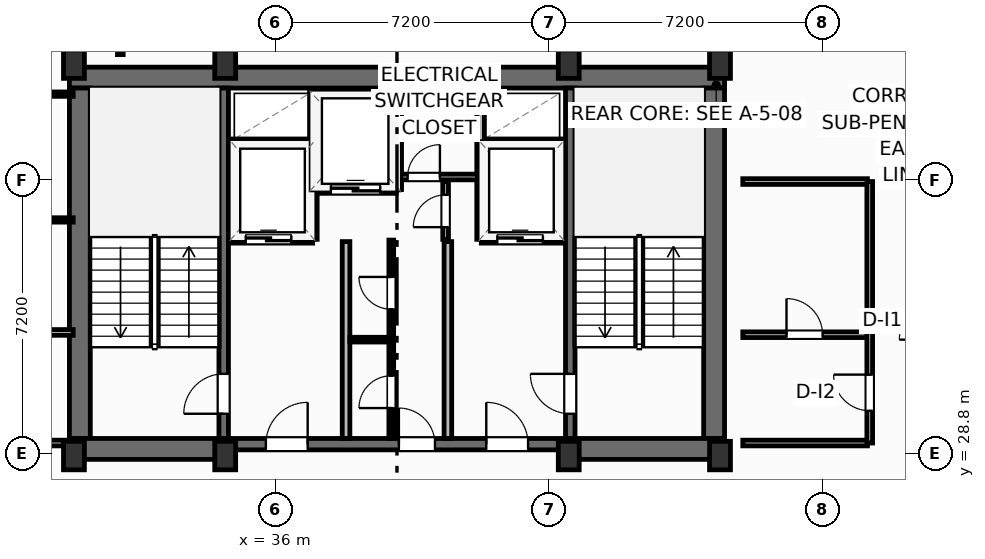
"""IFC4 building model, lengths in metres.
Left out: names, types, materials, properties, quantities, classifications, styles, units other than length and angle.
Written with IfcOpenShell. Run it as: python <this file> out.ifc"""

import sys

from ifc_helpers import new_model, si_unit, direction, frame, frame_2d, origin, origin_2d, place, context, subcontext, project, spatial, rectangle, extrude, element, fill, save


model = new_model("IFC4")
c1 = context("Model", 3, precision=1e-05, world=origin(), true_north=direction((0.0, 1.0)))
c2 = subcontext(c1, "Body", "Model", "MODEL_VIEW")
j1 = project(units=[si_unit("LENGTHUNIT", "METRE"), si_unit("PLANEANGLEUNIT", "RADIAN")], contexts=[c1])
p1 = place(None, origin())
s1 = spatial("IfcSite", under=j1, at=p1, CompositionType="ELEMENT")
p2 = place(p1, origin())
s2 = spatial("IfcBuilding", under=s1, at=p2, CompositionType="ELEMENT")
p3 = place(p2, frame((0.0, 0.0, 284.1)))
s3 = spatial("IfcBuildingStorey", under=s2, at=p3, CompositionType="ELEMENT", Elevation=284.1)
for number, where, z_axis, x_axis in (
    (1, (30.7, 28.75, 0.0), (0.0, 0.0, 1.0), (1.0, 0.0, 0.0)),
    (2, (34.68, 28.75, 0.0), (0.0, 0.0, 1.0), (1.0, 0.0, 0.0)),
    (3, (43.72, 28.75, 0.0), (0.0, 0.0, 1.0), (1.0, 0.0, 0.0)),
    (4, (47.7, 28.75, 0.0), (0.0, 0.0, 1.0), (1.0, 0.0, 0.0)),
    (5, (30.7, 39.05, 0.0), (0.0, 0.0, 1.0), (1.0, 0.0, 0.0)),
    (6, (34.68, 39.05, 0.0), (0.0, 0.0, 1.0), (1.0, 0.0, 0.0)),
    (7, (43.72, 39.05, 0.0), (0.0, 0.0, 1.0), (1.0, 0.0, 0.0)),
    (8, (47.7, 39.05, 0.0), (0.0, 0.0, 1.0), (1.0, 0.0, 0.0)),
):
    element("IfcColumn", number, at=place(p3, frame(where, z_axis=z_axis, x_axis=x_axis)), inside=s3, PredefinedType="COLUMN", context=c2, shape_type="SweptSolid", body=[
        extrude(rectangle(XDim=0.55, YDim=0.75, at=origin_2d()), origin(), (0.0, 0.0, 1.0), 3.7),
    ])
p4 = place(p3, frame((30.58, 38.695, 0.0), z_axis=(0.0, 0.0, 1.0), x_axis=(1.0, 0.0, 0.0)))
e9 = element("IfcWall", 9, at=p4, inside=s3, PredefinedType="SHEAR", context=c2, shape_type="SweptSolid", body=[
    extrude(rectangle(XDim=17.24, YDim=0.55, at=frame_2d((8.62, 0.0))), origin(), (0.0, 0.0, 1.0), 3.45),
])
for number, where, z_axis, x_axis in (
    (10, (30.855, 29.2, 0.0), (0.0, 0.0, 1.0), (0.0, 1.0, 0.0)),
    (11, (47.545, 29.2, 0.0), (0.0, 0.0, 1.0), (0.0, 1.0, 0.0)),
):
    element("IfcWall", number, at=place(p3, frame(where, z_axis=z_axis, x_axis=x_axis)), inside=s3, PredefinedType="SHEAR", context=c2, shape_type="SweptSolid", body=[
        extrude(rectangle(XDim=9.22, YDim=0.55, at=frame_2d((4.61, 0.0))), origin(), (0.0, 0.0, 1.0), 3.45),
    ])
for number, where, z_axis, x_axis in (
    (12, (30.58, 28.925, 0.0), (0.0, 0.0, 1.0), (1.0, 0.0, 0.0)),
    (13, (43.6, 28.925, 0.0), (0.0, 0.0, 1.0), (1.0, 0.0, 0.0)),
):
    element("IfcWall", number, at=place(p3, frame(where, z_axis=z_axis, x_axis=x_axis)), inside=s3, PredefinedType="SHEAR", context=c2, shape_type="SweptSolid", body=[
        extrude(rectangle(XDim=4.22, YDim=0.55, at=frame_2d((2.11, 0.0))), origin(), (0.0, 0.0, 1.0), 3.45),
    ])
p5 = place(p3, frame((34.8, 29.05, 0.0), z_axis=(0.0, 0.0, 1.0), x_axis=(1.0, 0.0, 0.0)))
e14 = element("IfcWall", 14, at=p5, inside=s3, PredefinedType="SHEAR", context=c2, shape_type="SweptSolid", body=[
    extrude(rectangle(XDim=8.8, YDim=0.3, at=frame_2d((4.4, 0.0))), origin(), (0.0, 0.0, 1.0), 3.45),
])
p6 = place(p5, frame((0.95, 0.0, 0.0)))
e15 = element("IfcOpeningElement", 15, at=p6, cuts=e14, PredefinedType="OPENING", context=c2, shape_type="SweptSolid", body=[
    extrude(rectangle(XDim=1.1, YDim=2.15, at=frame_2d((0.55, 1.075))), frame((0.0, 0.16, 0.0), z_axis=(0.0, -1.0, 0.0), x_axis=(1.0, 0.0, 0.0)), (0.0, 0.0, 1.0), 0.32),
])
p7 = place(p5, frame((6.75, 0.0, 0.0)))
e16 = element("IfcOpeningElement", 16, at=p7, cuts=e14, PredefinedType="OPENING", context=c2, shape_type="SweptSolid", body=[
    extrude(rectangle(XDim=1.1, YDim=2.15, at=frame_2d((0.55, 1.075))), frame((0.0, 0.16, 0.0), z_axis=(0.0, -1.0, 0.0), x_axis=(1.0, 0.0, 0.0)), (0.0, 0.0, 1.0), 0.32),
])
p8 = place(p5, frame((4.45, 0.0, 0.0)))
e17 = element("IfcOpeningElement", 17, at=p8, cuts=e14, PredefinedType="OPENING", context=c2, shape_type="SweptSolid", body=[
    extrude(rectangle(XDim=0.95, YDim=2.15, at=frame_2d((0.475, 1.075))), frame((0.0, 0.16, 0.0), z_axis=(0.0, -1.0, 0.0), x_axis=(1.0, 0.0, 0.0)), (0.0, 0.0, 1.0), 0.32),
])
p9 = place(p3, frame((34.64, 29.2, 0.0), z_axis=(0.0, 0.0, 1.0), x_axis=(0.0, 1.0, 0.0)))
e18 = element("IfcWall", 18, at=p9, inside=s3, PredefinedType="SHEAR", context=c2, shape_type="SweptSolid", body=[
    extrude(rectangle(XDim=9.22, YDim=0.25, at=frame_2d((4.61, 0.0))), origin(), (0.0, 0.0, 1.0), 3.45),
])
p10 = place(p9, frame((0.65, 0.0, 0.0)))
e19 = element("IfcOpeningElement", 19, at=p10, cuts=e18, PredefinedType="OPENING", context=c2, shape_type="SweptSolid", body=[
    extrude(rectangle(XDim=1.05, YDim=2.15, at=frame_2d((0.525, 1.075))), frame((0.0, 0.135, 0.0), z_axis=(0.0, -1.0, 0.0), x_axis=(1.0, 0.0, 0.0)), (0.0, 0.0, 1.0), 0.27),
])
p11 = place(p3, frame((43.76, 29.2, 0.0), z_axis=(0.0, 0.0, 1.0), x_axis=(0.0, 1.0, 0.0)))
e20 = element("IfcWall", 20, at=p11, inside=s3, PredefinedType="SHEAR", context=c2, shape_type="SweptSolid", body=[
    extrude(rectangle(XDim=9.22, YDim=0.25, at=frame_2d((4.61, 0.0))), origin(), (0.0, 0.0, 1.0), 3.45),
])
p12 = place(p11, frame((0.65, 0.0, 0.0)))
e21 = element("IfcOpeningElement", 21, at=p12, cuts=e20, PredefinedType="OPENING", context=c2, shape_type="SweptSolid", body=[
    extrude(rectangle(XDim=1.05, YDim=2.15, at=frame_2d((0.525, 1.075))), frame((0.0, 0.135, 0.0), z_axis=(0.0, -1.0, 0.0), x_axis=(1.0, 0.0, 0.0)), (0.0, 0.0, 1.0), 0.27),
])
p13 = place(p3, frame((26.297, 38.743, 0.0), z_axis=(0.0, 0.0, 1.0), x_axis=(0.823534636215, 0.567265989598, 0.0)))
e22 = element("IfcWall", 22, at=p13, inside=s3, PredefinedType="SOLIDWALL", context=c2, shape_type="SweptSolid", body=[
    extrude(rectangle(XDim=6.0, YDim=0.22, at=frame_2d((3.0, 0.0))), origin(), (0.0, 0.0, 1.0), 2.73),
])
p14 = place(p13, frame((3.5, 0.0, 0.0)))
e23 = element("IfcOpeningElement", 23, at=p14, cuts=e22, PredefinedType="OPENING", context=c2, shape_type="SweptSolid", body=[
    extrude(rectangle(XDim=2.1, YDim=2.3, at=frame_2d((1.05, 1.15))), frame((0.0, 0.12, 0.0), z_axis=(0.0, -1.0, 0.0), x_axis=(1.0, 0.0, 0.0)), (0.0, 0.0, 1.0), 0.24),
])
p15 = place(p13, frame((0.55, 0.0, 0.75)))
e24 = element("IfcOpeningElement", 24, at=p15, cuts=e22, PredefinedType="OPENING", context=c2, shape_type="SweptSolid", body=[
    extrude(rectangle(XDim=2.4, YDim=1.85, at=frame_2d((1.2, 0.925))), frame((0.0, 0.12, 0.0), z_axis=(0.0, -1.0, 0.0), x_axis=(1.0, 0.0, 0.0)), (0.0, 0.0, 1.0), 0.24),
])
p16 = place(p3, frame((31.92, 39.3, 0.0), z_axis=(0.0, 0.0, 1.0), x_axis=(0.0, 1.0, 0.0)))
e25 = element("IfcWall", 25, at=p16, inside=s3, PredefinedType="PARTITIONING", context=c2, shape_type="SweptSolid", body=[
    extrude(rectangle(XDim=2.12, YDim=0.15, at=frame_2d((1.06, 0.0))), origin(), (0.0, 0.0, 1.0), 3.45),
])
for number, where, z_axis, x_axis in (
    (26, (37.86, 29.2, 0.0), (0.0, 0.0, 1.0), (0.0, 1.0, 0.0)),
    (27, (40.54, 29.2, 0.0), (0.0, 0.0, 1.0), (0.0, 1.0, 0.0)),
):
    element("IfcWall", number, at=place(p3, frame(where, z_axis=z_axis, x_axis=x_axis)), inside=s3, PredefinedType="PARTITIONING", context=c2, shape_type="SweptSolid", body=[
        extrude(rectangle(XDim=5.18, YDim=0.2, at=frame_2d((2.59, 0.0))), origin(), (0.0, 0.0, 1.0), 3.45),
    ])
p17 = place(p3, frame((34.8, 34.44, 0.0), z_axis=(0.0, 0.0, 1.0), x_axis=(1.0, 0.0, 0.0)))
e28 = element("IfcWall", 28, at=p17, inside=s3, PredefinedType="PARTITIONING", context=c2, shape_type="SweptSolid", body=[
    extrude(rectangle(XDim=2.18, YDim=0.2, at=frame_2d((1.09, 0.0))), origin(), (0.0, 0.0, 1.0), 3.45),
])
p18 = place(p17, frame((0.42, 0.0, 0.0)))
e29 = element("IfcOpeningElement", 29, at=p18, cuts=e28, PredefinedType="OPENING", context=c2, shape_type="SweptSolid", body=[
    extrude(rectangle(XDim=1.2, YDim=2.2, at=frame_2d((0.6, 1.1))), frame((0.0, 0.11, 0.0), z_axis=(0.0, -1.0, 0.0), x_axis=(1.0, 0.0, 0.0)), (0.0, 0.0, 1.0), 0.22),
])
p19 = place(p3, frame((34.8, 36.98, 0.0), z_axis=(0.0, 0.0, 1.0), x_axis=(1.0, 0.0, 0.0)))
e30 = element("IfcWall", 30, at=p19, inside=s3, PredefinedType="PARTITIONING", context=c2, shape_type="SweptSolid", body=[
    extrude(rectangle(XDim=2.18, YDim=0.2, at=frame_2d((1.09, 0.0))), origin(), (0.0, 0.0, 1.0), 3.45),
])
p20 = place(p3, frame((37.0, 34.44, 0.0), z_axis=(0.0, 0.0, 1.0), x_axis=(0.0, 1.0, 0.0)))
e31 = element("IfcWall", 31, at=p20, inside=s3, PredefinedType="PARTITIONING", context=c2, shape_type="SweptSolid", body=[
    extrude(rectangle(XDim=3.9, YDim=0.2, at=frame_2d((1.95, 0.0))), origin(), (0.0, 0.0, 1.0), 3.45),
])
p21 = place(p3, frame((41.42, 34.44, 0.0), z_axis=(0.0, 0.0, 1.0), x_axis=(1.0, 0.0, 0.0)))
e32 = element("IfcWall", 32, at=p21, inside=s3, PredefinedType="PARTITIONING", context=c2, shape_type="SweptSolid", body=[
    extrude(rectangle(XDim=2.18, YDim=0.2, at=frame_2d((1.09, 0.0))), origin(), (0.0, 0.0, 1.0), 3.45),
])
p22 = place(p21, frame((0.42, 0.0, 0.0)))
e33 = element("IfcOpeningElement", 33, at=p22, cuts=e32, PredefinedType="OPENING", context=c2, shape_type="SweptSolid", body=[
    extrude(rectangle(XDim=1.2, YDim=2.2, at=frame_2d((0.6, 1.1))), frame((0.0, 0.11, 0.0), z_axis=(0.0, -1.0, 0.0), x_axis=(1.0, 0.0, 0.0)), (0.0, 0.0, 1.0), 0.22),
])
p23 = place(p3, frame((41.42, 36.98, 0.0), z_axis=(0.0, 0.0, 1.0), x_axis=(1.0, 0.0, 0.0)))
e34 = element("IfcWall", 34, at=p23, inside=s3, PredefinedType="PARTITIONING", context=c2, shape_type="SweptSolid", body=[
    extrude(rectangle(XDim=2.18, YDim=0.2, at=frame_2d((1.09, 0.0))), origin(), (0.0, 0.0, 1.0), 3.45),
])
p24 = place(p3, frame((41.4, 34.44, 0.0), z_axis=(0.0, 0.0, 1.0), x_axis=(0.0, 1.0, 0.0)))
e35 = element("IfcWall", 35, at=p24, inside=s3, PredefinedType="PARTITIONING", context=c2, shape_type="SweptSolid", body=[
    extrude(rectangle(XDim=3.9, YDim=0.2, at=frame_2d((1.95, 0.0))), origin(), (0.0, 0.0, 1.0), 3.45),
])
p25 = place(p3, frame((37.06, 35.75, 0.0), z_axis=(0.0, 0.0, 1.0), x_axis=(1.0, 0.0, 0.0)))
e36 = element("IfcWall", 36, at=p25, inside=s3, PredefinedType="PARTITIONING", context=c2, shape_type="SweptSolid", body=[
    extrude(rectangle(XDim=2.12, YDim=0.2, at=frame_2d((1.06, 0.0))), origin(), (0.0, 0.0, 1.0), 3.45),
])
p26 = place(p25, frame((0.4, 0.0, 0.0)))
e37 = element("IfcOpeningElement", 37, at=p26, cuts=e36, PredefinedType="OPENING", context=c2, shape_type="SweptSolid", body=[
    extrude(rectangle(XDim=1.3, YDim=2.2, at=frame_2d((0.65, 1.1))), frame((0.0, 0.11, 0.0), z_axis=(0.0, -1.0, 0.0), x_axis=(1.0, 0.0, 0.0)), (0.0, 0.0, 1.0), 0.22),
])
p27 = place(p3, frame((39.22, 35.75, 0.0), z_axis=(0.0, 0.0, 1.0), x_axis=(0.0, 1.0, 0.0)))
e38 = element("IfcWall", 38, at=p27, inside=s3, PredefinedType="PARTITIONING", context=c2, shape_type="SweptSolid", body=[
    extrude(rectangle(XDim=2.59, YDim=0.2, at=frame_2d((1.295, 0.0))), origin(), (0.0, 0.0, 1.0), 3.45),
])
p28 = place(p3, frame((39.3, 36.08, 0.0), z_axis=(0.0, 0.0, 1.0), x_axis=(1.0, 0.0, 0.0)))
e39 = element("IfcWall", 39, at=p28, inside=s3, PredefinedType="PARTITIONING", context=c2, shape_type="SweptSolid", body=[
    extrude(rectangle(XDim=2.02, YDim=0.15, at=frame_2d((1.01, 0.0))), origin(), (0.0, 0.0, 1.0), 3.45),
])
p29 = place(p28, frame((0.18, 0.0, 0.0)))
e40 = element("IfcOpeningElement", 40, at=p29, cuts=e39, PredefinedType="OPENING", context=c2, shape_type="SweptSolid", body=[
    extrude(rectangle(XDim=0.85, YDim=2.05, at=frame_2d((0.425, 1.025))), frame((0.0, 0.085, 0.0), z_axis=(0.0, -1.0, 0.0), x_axis=(1.0, 0.0, 0.0)), (0.0, 0.0, 1.0), 0.17),
])
p30 = place(p3, frame((40.48, 34.44, 0.0), z_axis=(0.0, 0.0, 1.0), x_axis=(0.0, 1.0, 0.0)))
e41 = element("IfcWall", 41, at=p30, inside=s3, PredefinedType="PARTITIONING", context=c2, shape_type="SweptSolid", body=[
    extrude(rectangle(XDim=1.52, YDim=0.15, at=frame_2d((0.76, 0.0))), origin(), (0.0, 0.0, 1.0), 3.45),
])
p31 = place(p30, frame((0.32, 0.0, 0.0)))
e42 = element("IfcOpeningElement", 42, at=p31, cuts=e41, PredefinedType="OPENING", context=c2, shape_type="SweptSolid", body=[
    extrude(rectangle(XDim=0.85, YDim=2.05, at=frame_2d((0.425, 1.025))), frame((0.0, 0.085, 0.0), z_axis=(0.0, -1.0, 0.0), x_axis=(1.0, 0.0, 0.0)), (0.0, 0.0, 1.0), 0.17),
])
p32 = place(p3, frame((37.96, 31.8, 0.0), z_axis=(0.0, 0.0, 1.0), x_axis=(1.0, 0.0, 0.0)))
e43 = element("IfcWall", 43, at=p32, inside=s3, PredefinedType="PARTITIONING", context=c2, shape_type="SweptSolid", body=[
    extrude(rectangle(XDim=1.09, YDim=0.125, at=frame_2d((0.545, 0.0))), origin(), (0.0, 0.0, 1.0), 3.45),
])
p33 = place(p3, frame((39.05, 29.2, 0.0), z_axis=(0.0, 0.0, 1.0), x_axis=(0.0, 1.0, 0.0)))
e44 = element("IfcWall", 44, at=p33, inside=s3, PredefinedType="PARTITIONING", context=c2, shape_type="SweptSolid", body=[
    extrude(rectangle(XDim=5.22, YDim=0.125, at=frame_2d((2.61, 0.0))), origin(), (0.0, 0.0, 1.0), 3.45),
])
p34 = place(p33, frame((0.8, 0.0, 0.0)))
e45 = element("IfcOpeningElement", 45, at=p34, cuts=e44, PredefinedType="OPENING", context=c2, shape_type="SweptSolid", body=[
    extrude(rectangle(XDim=0.85, YDim=2.05, at=frame_2d((0.425, 1.025))), frame((0.0, 0.073, 0.0), z_axis=(0.0, -1.0, 0.0), x_axis=(1.0, 0.0, 0.0)), (0.0, 0.0, 1.0), 0.145),
])
p35 = place(p33, frame((3.4, 0.0, 0.0)))
e46 = element("IfcOpeningElement", 46, at=p35, cuts=e44, PredefinedType="OPENING", context=c2, shape_type="SweptSolid", body=[
    extrude(rectangle(XDim=0.85, YDim=2.05, at=frame_2d((0.425, 1.025))), frame((0.0, 0.073, 0.0), z_axis=(0.0, -1.0, 0.0), x_axis=(1.0, 0.0, 0.0)), (0.0, 0.0, 1.0), 0.145),
])
p36 = place(p3, frame((26.78, 29.08, 0.0), z_axis=(0.0, 0.0, 1.0), x_axis=(1.0, 0.0, 0.0)))
e47 = element("IfcWall", 47, at=p36, inside=s3, PredefinedType="PARTITIONING", context=c2, shape_type="SweptSolid", body=[
    extrude(rectangle(XDim=3.8, YDim=0.15, at=frame_2d((1.9, 0.0))), origin(), (0.0, 0.0, 1.0), 3.45),
])
p37 = place(p3, frame((26.8, 31.99, 0.0), z_axis=(0.0, 0.0, 1.0), x_axis=(1.0, 0.0, 0.0)))
e48 = element("IfcWall", 48, at=p37, inside=s3, PredefinedType="PARTITIONING", context=c2, shape_type="SweptSolid", body=[
    extrude(rectangle(XDim=3.88, YDim=0.15, at=frame_2d((1.94, 0.0))), origin(), (0.0, 0.0, 1.0), 3.45),
])
p38 = place(p3, frame((26.8, 34.95, 0.0), z_axis=(0.0, 0.0, 1.0), x_axis=(1.0, 0.0, 0.0)))
e49 = element("IfcWall", 49, at=p38, inside=s3, PredefinedType="PARTITIONING", context=c2, shape_type="SweptSolid", body=[
    extrude(rectangle(XDim=3.88, YDim=0.115, at=frame_2d((1.94, 0.0))), origin(), (0.0, 0.0, 1.0), 3.45),
])
p39 = place(p3, frame((26.78, 38.26, 0.0), z_axis=(0.0, 0.0, 1.0), x_axis=(1.0, 0.0, 0.0)))
e50 = element("IfcWall", 50, at=p39, inside=s3, PredefinedType="PARTITIONING", context=c2, shape_type="SweptSolid", body=[
    extrude(rectangle(XDim=3.9, YDim=0.115, at=frame_2d((1.95, 0.0))), origin(), (0.0, 0.0, 1.0), 3.45),
])
p40 = place(p3, frame((48.3, 31.93, 0.0), z_axis=(0.0, 0.0, 1.0), x_axis=(1.0, 0.0, 0.0)))
e51 = element("IfcWall", 51, at=p40, inside=s3, PredefinedType="PARTITIONING", context=c2, shape_type="SweptSolid", body=[
    extrude(rectangle(XDim=3.28, YDim=0.15, at=frame_2d((1.64, 0.0))), origin(), (0.0, 0.0, 1.0), 3.45),
])
p41 = place(p40, frame((1.15, 0.0, 0.0)))
e52 = element("IfcOpeningElement", 52, at=p41, cuts=e51, PredefinedType="OPENING", context=c2, shape_type="SweptSolid", body=[
    extrude(rectangle(XDim=0.95, YDim=2.05, at=frame_2d((0.475, 1.025))), frame((0.0, 0.085, 0.0), z_axis=(0.0, -1.0, 0.0), x_axis=(1.0, 0.0, 0.0)), (0.0, 0.0, 1.0), 0.17),
])
p42 = place(p3, frame((48.3, 29.08, 0.0), z_axis=(0.0, 0.0, 1.0), x_axis=(1.0, 0.0, 0.0)))
e53 = element("IfcWall", 53, at=p42, inside=s3, PredefinedType="PARTITIONING", context=c2, shape_type="SweptSolid", body=[
    extrude(rectangle(XDim=3.28, YDim=0.15, at=frame_2d((1.64, 0.0))), origin(), (0.0, 0.0, 1.0), 2.662),
])
p43 = place(p3, frame((48.3, 35.96, 0.0), z_axis=(0.0, 0.0, 1.0), x_axis=(1.0, 0.0, 0.0)))
e54 = element("IfcWall", 54, at=p43, inside=s3, PredefinedType="PARTITIONING", context=c2, shape_type="SweptSolid", body=[
    extrude(rectangle(XDim=3.28, YDim=0.15, at=frame_2d((1.64, 0.0))), origin(), (0.0, 0.0, 1.0), 3.45),
])
p44 = place(p3, frame((51.64, 29.08, 0.0), z_axis=(0.0, 0.0, 1.0), x_axis=(0.0, 1.0, 0.0)))
e55 = element("IfcWall", 55, at=p44, inside=s3, PredefinedType="PARTITIONING", context=c2, shape_type="SweptSolid", body=[
    extrude(rectangle(XDim=6.88, YDim=0.15, at=frame_2d((3.44, 0.0))), origin(), (0.0, 0.0, 1.0), 3.45),
])
p45 = place(p44, frame((0.85, 0.0, 0.0)))
e56 = element("IfcOpeningElement", 56, at=p45, cuts=e55, PredefinedType="OPENING", context=c2, shape_type="SweptSolid", body=[
    extrude(rectangle(XDim=0.95, YDim=2.05, at=frame_2d((0.475, 1.025))), frame((0.0, 0.085, 0.0), z_axis=(0.0, -1.0, 0.0), x_axis=(1.0, 0.0, 0.0)), (0.0, 0.0, 1.0), 0.17),
])
p46 = place(p10, origin())
e57 = element("IfcDoor", 57, at=p46, inside=s3, OperationType="SINGLE_SWING_LEFT", PredefinedType="DOOR", context=c2, shape_type="SweptSolid", body=[
    extrude(rectangle(XDim=1.05, YDim=2.15, at=frame_2d((0.525, 1.075))), frame((0.0, 0.025, 0.0), z_axis=(0.0, -1.0, 0.0), x_axis=(1.0, 0.0, 0.0)), (0.0, 0.0, 1.0), 0.05),
])
fill(e19, e57)
p47 = place(p12, origin())
e58 = element("IfcDoor", 58, at=p47, inside=s3, OperationType="SINGLE_SWING_RIGHT", PredefinedType="DOOR", context=c2, shape_type="SweptSolid", body=[
    extrude(rectangle(XDim=1.05, YDim=2.15, at=frame_2d((0.525, 1.075))), frame((0.0, 0.025, 0.0), z_axis=(0.0, -1.0, 0.0), x_axis=(1.0, 0.0, 0.0)), (0.0, 0.0, 1.0), 0.05),
])
fill(e21, e58)
p48 = place(p6, origin())
e59 = element("IfcDoor", 59, at=p48, inside=s3, OperationType="SINGLE_SWING_RIGHT", PredefinedType="DOOR", context=c2, shape_type="SweptSolid", body=[
    extrude(rectangle(XDim=1.1, YDim=2.15, at=frame_2d((0.55, 1.075))), frame((0.0, 0.025, 0.0), z_axis=(0.0, -1.0, 0.0), x_axis=(1.0, 0.0, 0.0)), (0.0, 0.0, 1.0), 0.05),
])
fill(e15, e59)
p49 = place(p7, origin())
e60 = element("IfcDoor", 60, at=p49, inside=s3, OperationType="SINGLE_SWING_LEFT", PredefinedType="DOOR", context=c2, shape_type="SweptSolid", body=[
    extrude(rectangle(XDim=1.1, YDim=2.15, at=frame_2d((0.55, 1.075))), frame((0.0, 0.025, 0.0), z_axis=(0.0, -1.0, 0.0), x_axis=(1.0, 0.0, 0.0)), (0.0, 0.0, 1.0), 0.05),
])
fill(e16, e60)
p50 = place(p18, origin())
e61 = element("IfcDoor", 61, at=p50, inside=s3, OperationType="SLIDING_TO_LEFT", PredefinedType="DOOR", context=c2, shape_type="SweptSolid", body=[
    extrude(rectangle(XDim=1.2, YDim=2.2, at=frame_2d((0.6, 1.1))), frame((0.0, 0.025, 0.0), z_axis=(0.0, -1.0, 0.0), x_axis=(1.0, 0.0, 0.0)), (0.0, 0.0, 1.0), 0.05),
])
fill(e29, e61)
p51 = place(p22, origin())
e62 = element("IfcDoor", 62, at=p51, inside=s3, OperationType="SLIDING_TO_LEFT", PredefinedType="DOOR", context=c2, shape_type="SweptSolid", body=[
    extrude(rectangle(XDim=1.2, YDim=2.2, at=frame_2d((0.6, 1.1))), frame((0.0, 0.025, 0.0), z_axis=(0.0, -1.0, 0.0), x_axis=(1.0, 0.0, 0.0)), (0.0, 0.0, 1.0), 0.05),
])
fill(e33, e62)
p52 = place(p26, origin())
e63 = element("IfcDoor", 63, at=p52, inside=s3, OperationType="SLIDING_TO_LEFT", PredefinedType="DOOR", context=c2, shape_type="SweptSolid", body=[
    extrude(rectangle(XDim=1.3, YDim=2.2, at=frame_2d((0.65, 1.1))), frame((0.0, 0.025, 0.0), z_axis=(0.0, -1.0, 0.0), x_axis=(1.0, 0.0, 0.0)), (0.0, 0.0, 1.0), 0.05),
])
fill(e37, e63)
p53 = place(p29, origin())
e64 = element("IfcDoor", 64, at=p53, inside=s3, OperationType="SINGLE_SWING_RIGHT", PredefinedType="DOOR", context=c2, shape_type="SweptSolid", body=[
    extrude(rectangle(XDim=0.85, YDim=2.05, at=frame_2d((0.425, 1.025))), frame((0.0, 0.025, 0.0), z_axis=(0.0, -1.0, 0.0), x_axis=(1.0, 0.0, 0.0)), (0.0, 0.0, 1.0), 0.05),
])
fill(e40, e64)
p54 = place(p31, origin())
e65 = element("IfcDoor", 65, at=p54, inside=s3, OperationType="SINGLE_SWING_LEFT", PredefinedType="DOOR", context=c2, shape_type="SweptSolid", body=[
    extrude(rectangle(XDim=0.85, YDim=2.05, at=frame_2d((0.425, 1.025))), frame((0.0, 0.025, 0.0), z_axis=(0.0, -1.0, 0.0), x_axis=(1.0, 0.0, 0.0)), (0.0, 0.0, 1.0), 0.05),
])
fill(e42, e65)
p55 = place(p34, origin())
e66 = element("IfcDoor", 66, at=p55, inside=s3, OperationType="SINGLE_SWING_LEFT", PredefinedType="DOOR", context=c2, shape_type="SweptSolid", body=[
    extrude(rectangle(XDim=0.85, YDim=2.05, at=frame_2d((0.425, 1.025))), frame((0.0, 0.025, 0.0), z_axis=(0.0, -1.0, 0.0), x_axis=(1.0, 0.0, 0.0)), (0.0, 0.0, 1.0), 0.05),
])
fill(e45, e66)
p56 = place(p35, origin())
e67 = element("IfcDoor", 67, at=p56, inside=s3, OperationType="SINGLE_SWING_RIGHT", PredefinedType="DOOR", context=c2, shape_type="SweptSolid", body=[
    extrude(rectangle(XDim=0.85, YDim=2.05, at=frame_2d((0.425, 1.025))), frame((0.0, 0.025, 0.0), z_axis=(0.0, -1.0, 0.0), x_axis=(1.0, 0.0, 0.0)), (0.0, 0.0, 1.0), 0.05),
])
fill(e46, e67)
p57 = place(p8, origin())
e68 = element("IfcDoor", 68, at=p57, inside=s3, OperationType="SINGLE_SWING_LEFT", PredefinedType="DOOR", context=c2, shape_type="SweptSolid", body=[
    extrude(rectangle(XDim=0.95, YDim=2.15, at=frame_2d((0.475, 1.075))), frame((0.0, 0.025, 0.0), z_axis=(0.0, -1.0, 0.0), x_axis=(1.0, 0.0, 0.0)), (0.0, 0.0, 1.0), 0.05),
])
fill(e17, e68)
p58 = place(p41, origin())
e69 = element("IfcDoor", 69, at=p58, inside=s3, OperationType="SINGLE_SWING_LEFT", PredefinedType="DOOR", context=c2, shape_type="SweptSolid", body=[
    extrude(rectangle(XDim=0.95, YDim=2.05, at=frame_2d((0.475, 1.025))), frame((0.0, 0.025, 0.0), z_axis=(0.0, -1.0, 0.0), x_axis=(1.0, 0.0, 0.0)), (0.0, 0.0, 1.0), 0.05),
])
fill(e52, e69)
p59 = place(p45, origin())
e70 = element("IfcDoor", 70, at=p59, inside=s3, OperationType="SINGLE_SWING_RIGHT", PredefinedType="DOOR", context=c2, shape_type="SweptSolid", body=[
    extrude(rectangle(XDim=0.95, YDim=2.05, at=frame_2d((0.475, 1.025))), frame((0.0, 0.025, 0.0), z_axis=(0.0, -1.0, 0.0), x_axis=(1.0, 0.0, 0.0)), (0.0, 0.0, 1.0), 0.05),
])
fill(e56, e70)
save(model, sys.argv[1])
